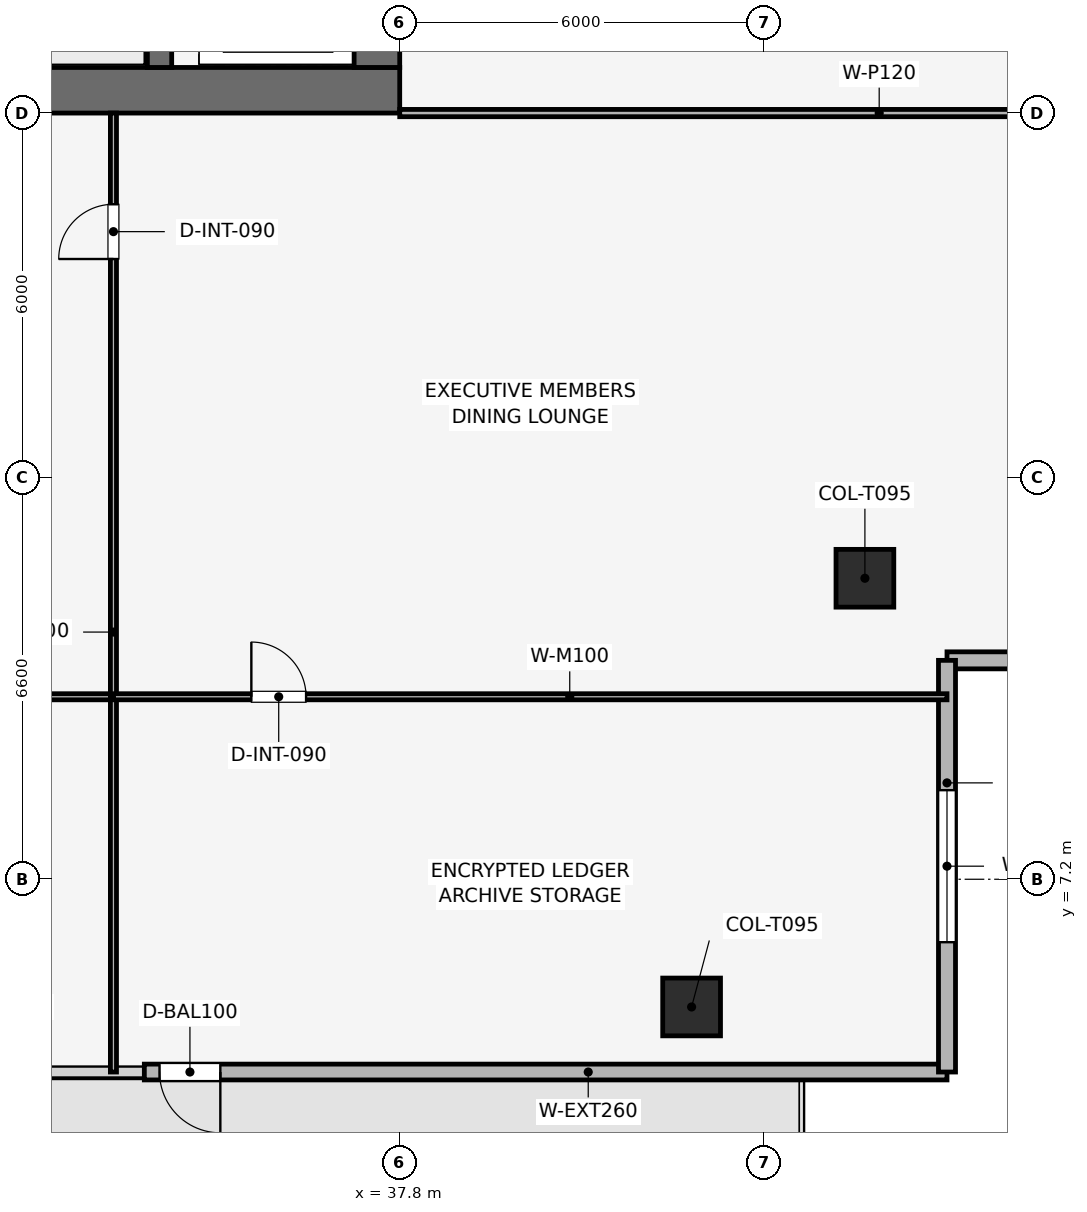
"""IFC4 building model, lengths in metres.
Left out: names, types, materials, properties, quantities, classifications, styles, units other than length and angle.
Written with IfcOpenShell. Run it as: python <this file> out.ifc"""

import sys

from ifc_helpers import new_model, si_unit, direction, frame, frame_2d, origin, origin_2d, place, context, subcontext, project, spatial, rectangle, extrude, element, fill, save


model = new_model("IFC4")
c1 = context("Model", 3, precision=1e-05, world=origin(), true_north=direction((0.0, 1.0)))
c2 = subcontext(c1, "Body", "Model", "MODEL_VIEW")
j1 = project(units=[si_unit("LENGTHUNIT", "METRE"), si_unit("PLANEANGLEUNIT", "RADIAN")], contexts=[c1])
p1 = place(None, origin())
s1 = spatial("IfcSite", under=j1, at=p1, CompositionType="ELEMENT")
p2 = place(p1, origin())
s2 = spatial("IfcBuilding", under=s1, at=p2, CompositionType="ELEMENT")
p3 = place(p2, frame((0.0, 0.0, 250.35)))
s3 = spatial("IfcBuildingStorey", under=s2, at=p3, CompositionType="ELEMENT", Elevation=250.35)
p4 = place(p3, frame((19.8, 20.175, 0.0), z_axis=(0.0, 0.0, 1.0), x_axis=(1.0, 0.0, 0.0)))
e1 = element("IfcWall", 1, at=p4, inside=s3, PredefinedType="SHEAR", context=c2, shape_type="SweptSolid", body=[
    extrude(rectangle(XDim=18.0, YDim=0.75, at=frame_2d((9.0, 0.0))), origin(), (0.0, 0.0, 1.0), 3.75),
])
p5 = place(p3, frame((37.425, 20.55, 0.0), z_axis=(0.0, 0.0, 1.0), x_axis=(0.0, 1.0, 0.0)))
e2 = element("IfcWall", 2, at=p5, inside=s3, PredefinedType="SHEAR", context=c2, shape_type="SweptSolid", body=[
    extrude(rectangle(XDim=16.5, YDim=0.75, at=frame_2d((8.25, 0.0))), origin(), (0.0, 0.0, 1.0), 3.75),
])
p6 = place(p5, frame((4.75, 0.0, 0.0)))
e3 = element("IfcOpeningElement", 3, at=p6, cuts=e2, PredefinedType="OPENING", context=c2, shape_type="SweptSolid", body=[
    extrude(rectangle(XDim=1.1, YDim=2.15, at=frame_2d((0.55, 1.075))), frame((0.0, 0.385, 0.0), z_axis=(0.0, -1.0, 0.0), x_axis=(1.0, 0.0, 0.0)), (0.0, 0.0, 1.0), 0.77),
])
p7 = place(p3, frame((33.85, 20.55, 0.0), z_axis=(0.0, 0.0, 1.0), x_axis=(0.0, 1.0, 0.0)))
e4 = element("IfcWall", 4, at=p7, inside=s3, PredefinedType="SHEAR", context=c2, shape_type="SweptSolid", body=[
    extrude(rectangle(XDim=16.5, YDim=0.4, at=frame_2d((8.25, 0.0))), origin(), (0.0, 0.0, 1.0), 3.75),
])
for number, where, z_axis, x_axis in (
    (5, (42.6, 5.1, 0.003), (0.0, 0.0, 1.0), (1.0, 0.0, 0.0)),
    (6, (45.45, 12.15, 0.003), (0.0, 0.0, 1.0), (1.0, 0.0, 0.0)),
):
    element("IfcColumn", number, at=place(p3, frame(where, z_axis=z_axis, x_axis=x_axis)), inside=s3, PredefinedType="COLUMN", context=c2, shape_type="SweptSolid", body=[
        extrude(rectangle(XDim=0.95, YDim=0.95, at=origin_2d()), origin(), (0.0, 0.0, 1.0), 3.494),
    ])
p8 = place(p3, frame((46.8, 4.03, 0.0), z_axis=(0.0, 0.0, 1.0), x_axis=(-1.0, 0.0, 0.0)))
e7 = element("IfcWall", 7, at=p8, inside=s3, PredefinedType="SOLIDWALL", context=c2, shape_type="SweptSolid", body=[
    extrude(rectangle(XDim=13.2, YDim=0.26, at=frame_2d((6.6, 0.0))), origin(), (0.0, 0.0, 1.0), 3.5),
])
p9 = place(p8, frame((11.95, 0.0, 0.0)))
e8 = element("IfcOpeningElement", 8, at=p9, cuts=e7, PredefinedType="OPENING", context=c2, shape_type="SweptSolid", body=[
    extrude(rectangle(XDim=1.0, YDim=2.2, at=frame_2d((0.5, 1.1))), frame((0.0, 0.14, 0.0), z_axis=(0.0, -1.0, 0.0), x_axis=(1.0, 0.0, 0.0)), (0.0, 0.0, 1.0), 0.28),
])
p10 = place(p3, frame((53.57, 10.8, 0.0), z_axis=(0.0, 0.0, 1.0), x_axis=(-1.0, 0.0, 0.0)))
e9 = element("IfcWall", 9, at=p10, inside=s3, PredefinedType="SOLIDWALL", context=c2, shape_type="SweptSolid", body=[
    extrude(rectangle(XDim=6.77, YDim=0.28, at=frame_2d((3.385, 0.0))), origin(), (0.0, 0.0, 1.0), 3.5),
])
p11 = place(p10, frame((2.135, 0.0, 0.9)))
e10 = element("IfcOpeningElement", 10, at=p11, cuts=e9, PredefinedType="OPENING", context=c2, shape_type="SweptSolid", body=[
    extrude(rectangle(XDim=2.5, YDim=1.9, at=frame_2d((1.25, 0.95))), frame((0.0, 0.15, 0.0), z_axis=(0.0, -1.0, 0.0), x_axis=(1.0, 0.0, 0.0)), (0.0, 0.0, 1.0), 0.3),
])
p12 = place(p3, frame((46.8, 10.8, 0.0), z_axis=(0.0, 0.0, 1.0), x_axis=(0.0, -1.0, 0.0)))
e11 = element("IfcWall", 11, at=p12, inside=s3, PredefinedType="SOLIDWALL", context=c2, shape_type="SweptSolid", body=[
    extrude(rectangle(XDim=6.77, YDim=0.28, at=frame_2d((3.385, 0.0))), origin(), (0.0, 0.0, 1.0), 3.5),
])
p13 = place(p12, frame((2.135, 0.0, 0.9)))
e12 = element("IfcOpeningElement", 12, at=p13, cuts=e11, PredefinedType="OPENING", context=c2, shape_type="SweptSolid", body=[
    extrude(rectangle(XDim=2.5, YDim=1.9, at=frame_2d((1.25, 0.95))), frame((0.0, 0.15, 0.0), z_axis=(0.0, -1.0, 0.0), x_axis=(1.0, 0.0, 0.0)), (0.0, 0.0, 1.0), 0.3),
])
p14 = place(p3, frame((22.1, 10.201, 0.0), z_axis=(0.0, 0.0, 1.0), x_axis=(1.0, 0.0, 0.0)))
e13 = element("IfcWall", 13, at=p14, inside=s3, PredefinedType="MOVABLE", context=c2, shape_type="SweptSolid", body=[
    extrude(rectangle(XDim=10.992, YDim=0.1, at=frame_2d((5.496, 0.0))), origin(), (0.0, 0.0, 1.0), 3.085),
])
p15 = place(p14, frame((0.2, 0.0, 0.0)))
e14 = element("IfcOpeningElement", 14, at=p15, cuts=e13, PredefinedType="OPENING", context=c2, shape_type="SweptSolid", body=[
    extrude(rectangle(XDim=0.9, YDim=2.1, at=frame_2d((0.45, 1.05))), frame((0.0, 0.06, 0.0), z_axis=(0.0, -1.0, 0.0), x_axis=(1.0, 0.0, 0.0)), (0.0, 0.0, 1.0), 0.12),
])
p16 = place(p3, frame((33.092, 4.03, 0.0), z_axis=(0.0, 0.0, 1.0), x_axis=(0.0, 1.0, 0.0)))
e15 = element("IfcWall", 15, at=p16, inside=s3, PredefinedType="MOVABLE", context=c2, shape_type="SweptSolid", body=[
    extrude(rectangle(XDim=15.77, YDim=0.1, at=frame_2d((7.885, 0.0))), origin(), (0.0, 0.0, 1.0), 3.085),
])
p17 = place(p16, frame((13.37, 0.0, 0.0)))
e16 = element("IfcOpeningElement", 16, at=p17, cuts=e15, PredefinedType="OPENING", context=c2, shape_type="SweptSolid", body=[
    extrude(rectangle(XDim=0.9, YDim=2.1, at=frame_2d((0.45, 1.05))), frame((0.0, 0.06, 0.0), z_axis=(0.0, -1.0, 0.0), x_axis=(1.0, 0.0, 0.0)), (0.0, 0.0, 1.0), 0.12),
])
p18 = place(p3, frame((33.092, 10.201, 0.0), z_axis=(0.0, 0.0, 1.0), x_axis=(1.0, 0.0, 0.0)))
e17 = element("IfcWall", 17, at=p18, inside=s3, PredefinedType="MOVABLE", context=c2, shape_type="SweptSolid", body=[
    extrude(rectangle(XDim=13.708, YDim=0.1, at=frame_2d((6.854, 0.0))), origin(), (0.0, 0.0, 1.0), 3.085),
])
p19 = place(p18, frame((2.268, 0.0, 0.0)))
e18 = element("IfcOpeningElement", 18, at=p19, cuts=e17, PredefinedType="OPENING", context=c2, shape_type="SweptSolid", body=[
    extrude(rectangle(XDim=0.9, YDim=2.1, at=frame_2d((0.45, 1.05))), frame((0.0, 0.06, 0.0), z_axis=(0.0, -1.0, 0.0), x_axis=(1.0, 0.0, 0.0)), (0.0, 0.0, 1.0), 0.12),
])
p20 = place(p3, frame((37.8, 19.8, 0.0), z_axis=(0.0, 0.0, 1.0), x_axis=(1.0, 0.0, 0.0)))
e19 = element("IfcWall", 19, at=p20, inside=s3, PredefinedType="PARTITIONING", context=c2, shape_type="SweptSolid", body=[
    extrude(rectangle(XDim=15.77, YDim=0.12, at=frame_2d((7.885, 0.0))), origin(), (0.0, 0.0, 1.0), 3.085),
])
p21 = place(p9, origin())
e20 = element("IfcDoor", 20, at=p21, inside=s3, OperationType="SINGLE_SWING_LEFT", PredefinedType="DOOR", context=c2, shape_type="SweptSolid", body=[
    extrude(rectangle(XDim=1.0, YDim=2.2, at=frame_2d((0.5, 1.1))), frame((0.0, 0.025, 0.0), z_axis=(0.0, -1.0, 0.0), x_axis=(1.0, 0.0, 0.0)), (0.0, 0.0, 1.0), 0.05),
])
fill(e8, e20)
p22 = place(p13, origin())
e21 = element("IfcWindow", 21, at=p22, inside=s3, PartitioningType="SINGLE_PANEL", PredefinedType="WINDOW", context=c2, shape_type="SweptSolid", body=[
    extrude(rectangle(XDim=2.5, YDim=1.9, at=frame_2d((1.25, 0.95))), frame((0.0, 0.03, 0.0), z_axis=(0.0, -1.0, 0.0), x_axis=(1.0, 0.0, 0.0)), (0.0, 0.0, 1.0), 0.06),
])
fill(e12, e21)
p23 = place(p17, origin())
e22 = element("IfcDoor", 22, at=p23, inside=s3, OperationType="SINGLE_SWING_LEFT", PredefinedType="DOOR", context=c2, shape_type="SweptSolid", body=[
    extrude(rectangle(XDim=0.9, YDim=2.1, at=frame_2d((0.45, 1.05))), frame((0.0, 0.025, 0.0), z_axis=(0.0, -1.0, 0.0), x_axis=(1.0, 0.0, 0.0)), (0.0, 0.0, 1.0), 0.05),
])
fill(e16, e22)
p24 = place(p19, origin())
e23 = element("IfcDoor", 23, at=p24, inside=s3, OperationType="SINGLE_SWING_LEFT", PredefinedType="DOOR", context=c2, shape_type="SweptSolid", body=[
    extrude(rectangle(XDim=0.9, YDim=2.1, at=frame_2d((0.45, 1.05))), frame((0.0, 0.025, 0.0), z_axis=(0.0, -1.0, 0.0), x_axis=(1.0, 0.0, 0.0)), (0.0, 0.0, 1.0), 0.05),
])
fill(e18, e23)
save(model, sys.argv[1])
